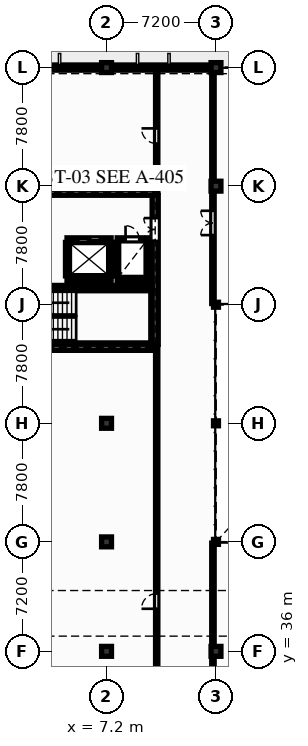
"""IFC4 building model, lengths in metres.
Left out: names, types, materials, properties, quantities, classifications, styles, units other than length and angle.
Written with IfcOpenShell. Run it as: python <this file> out.ifc"""

import sys

from ifc_helpers import new_model, si_unit, direction, frame, frame_2d, origin, origin_2d, place, context, subcontext, project, spatial, rectangle, hollow_circle, extrude, element, fill, save


model = new_model("IFC4")
c1 = context("Model", 3, precision=1e-05, world=origin(), true_north=direction((0.0, 1.0)))
c2 = subcontext(c1, "Body", "Model", "MODEL_VIEW")
j1 = project(units=[si_unit("LENGTHUNIT", "METRE"), si_unit("PLANEANGLEUNIT", "RADIAN")], contexts=[c1])
p1 = place(None, origin())
s1 = spatial("IfcSite", under=j1, at=p1, CompositionType="ELEMENT")
p2 = place(p1, origin())
s2 = spatial("IfcBuilding", under=s1, at=p2, CompositionType="ELEMENT")
p3 = place(p2, frame((0.0, 0.0, 5.1)))
s3 = spatial("IfcBuildingStorey", under=s2, at=p3, CompositionType="ELEMENT", Elevation=5.1)
for number, where, z_axis, x_axis in (
    (1, (7.2, 36.0, 0.0), (0.0, 0.0, 1.0), (1.0, 0.0, 0.0)),
    (2, (7.2, 43.2, 0.0), (0.0, 0.0, 1.0), (1.0, 0.0, 0.0)),
    (3, (7.2, 51.0, 0.0), (0.0, 0.0, 1.0), (1.0, 0.0, 0.0)),
    (4, (7.2, 74.4, 0.0), (0.0, 0.0, 1.0), (1.0, 0.0, 0.0)),
    (5, (14.4, 36.0, 0.0), (0.0, 0.0, 1.0), (1.0, 0.0, 0.0)),
):
    element("IfcColumn", number, at=place(p3, frame(where, z_axis=z_axis, x_axis=x_axis)), inside=s3, PredefinedType="COLUMN", context=c2, shape_type="SweptSolid", body=[
        extrude(rectangle(XDim=0.65, YDim=0.65, at=origin_2d()), origin(), (0.0, 0.0, 1.0), 3.84),
    ])
for number, where, z_axis, x_axis in (
    (6, (14.4, 43.2, 0.0), (0.0, 0.0, 1.0), (1.0, 0.0, 0.0)),
    (7, (14.4, 51.0, 0.0), (0.0, 0.0, 1.0), (1.0, 0.0, 0.0)),
    (8, (14.4, 58.8, 0.0), (0.0, 0.0, 1.0), (1.0, 0.0, 0.0)),
):
    element("IfcColumn", number, at=place(p3, frame(where, z_axis=z_axis, x_axis=x_axis)), inside=s3, PredefinedType="COLUMN", context=c2, shape_type="SweptSolid", body=[
        extrude(hollow_circle(Radius=0.162, WallThickness=0.012, at=origin_2d()), origin(), (0.0, 0.0, 1.0), 3.84),
    ])
for number, where, z_axis, x_axis in (
    (9, (14.4, 66.6, 0.0), (0.0, 0.0, 1.0), (1.0, 0.0, 0.0)),
    (10, (14.4, 74.4, 0.0), (0.0, 0.0, 1.0), (1.0, 0.0, 0.0)),
):
    element("IfcColumn", number, at=place(p3, frame(where, z_axis=z_axis, x_axis=x_axis)), inside=s3, PredefinedType="COLUMN", context=c2, shape_type="SweptSolid", body=[
        extrude(rectangle(XDim=0.65, YDim=0.65, at=origin_2d()), origin(), (0.0, 0.0, 1.0), 3.84),
    ])
p4 = place(p3, frame((0.0, 74.4, 0.0), z_axis=(0.0, 0.0, 1.0), x_axis=(1.0, 0.0, 0.0)))
e11 = element("IfcWall", 11, at=p4, inside=s3, PredefinedType="SOLIDWALL", context=c2, shape_type="SweptSolid", body=[
    extrude(rectangle(XDim=7.2, YDim=0.34, at=frame_2d((3.6, 0.0))), origin(), (0.0, 0.0, 1.0), 3.55),
])
p5 = place(p4, frame((2.2, 0.0, 0.898)))
e12 = element("IfcOpeningElement", 12, at=p5, cuts=e11, PredefinedType="OPENING", context=c2, shape_type="SweptSolid", body=[
    extrude(rectangle(XDim=1.75, YDim=2.15, at=frame_2d((0.875, 1.075))), frame((0.0, 0.18, 0.0), z_axis=(0.0, -1.0, 0.0), x_axis=(1.0, 0.0, 0.0)), (0.0, 0.0, 1.0), 0.36),
])
p6 = place(p3, frame((7.2, 74.4, 0.0), z_axis=(0.0, 0.0, 1.0), x_axis=(1.0, 0.0, 0.0)))
e13 = element("IfcWall", 13, at=p6, inside=s3, PredefinedType="SOLIDWALL", context=c2, shape_type="SweptSolid", body=[
    extrude(rectangle(XDim=7.2, YDim=0.34, at=frame_2d((3.6, 0.0))), origin(), (0.0, 0.0, 1.0), 3.55),
])
p7 = place(p6, frame((4.4, 0.0, 0.898)))
e14 = element("IfcOpeningElement", 14, at=p7, cuts=e13, PredefinedType="OPENING", context=c2, shape_type="SweptSolid", body=[
    extrude(rectangle(XDim=1.75, YDim=2.15, at=frame_2d((0.875, 1.075))), frame((0.0, 0.18, 0.0), z_axis=(0.0, -1.0, 0.0), x_axis=(1.0, 0.0, 0.0)), (0.0, 0.0, 1.0), 0.36),
])
for number, where, z_axis, x_axis in (
    (15, (0.17, 56.0, 0.0), (0.0, 0.0, 1.0), (1.0, 0.0, 0.0)),
    (16, (0.17, 66.2, 0.0), (0.0, 0.0, 1.0), (1.0, 0.0, 0.0)),
):
    element("IfcWall", number, at=place(p3, frame(where, z_axis=z_axis, x_axis=x_axis)), inside=s3, PredefinedType="SHEAR", context=c2, shape_type="SweptSolid", body=[
        extrude(rectangle(XDim=10.23, YDim=0.4, at=frame_2d((5.115, 0.0))), origin(), (0.0, 0.0, 1.0), 3.55),
    ])
p8 = place(p3, frame((10.4, 56.2, 0.0), z_axis=(0.0, 0.0, 1.0), x_axis=(0.0, 1.0, 0.0)))
e17 = element("IfcWall", 17, at=p8, inside=s3, PredefinedType="SHEAR", context=c2, shape_type="SweptSolid", body=[
    extrude(rectangle(XDim=9.8, YDim=0.4, at=frame_2d((4.9, 0.0))), origin(), (0.0, 0.0, 1.0), 3.55),
])
p9 = place(p8, frame((6.8, 0.0, 0.0)))
e18 = element("IfcOpeningElement", 18, at=p9, cuts=e17, PredefinedType="OPENING", context=c2, shape_type="SweptSolid", body=[
    extrude(rectangle(XDim=1.5, YDim=2.2, at=frame_2d((0.75, 1.1))), frame((0.0, 0.21, 0.0), z_axis=(0.0, -1.0, 0.0), x_axis=(1.0, 0.0, 0.0)), (0.0, 0.0, 1.0), 0.42),
])
p10 = place(p3, frame((0.17, 59.895, 0.0), z_axis=(0.0, 0.0, 1.0), x_axis=(1.0, 0.0, 0.0)))
e19 = element("IfcWall", 19, at=p10, inside=s3, PredefinedType="SHEAR", context=c2, shape_type="SweptSolid", body=[
    extrude(rectangle(XDim=10.03, YDim=0.35, at=frame_2d((5.015, 0.0))), origin(), (0.0, 0.0, 1.0), 3.55),
])
p11 = place(p10, frame((0.45, 0.0, 0.0)))
e20 = element("IfcOpeningElement", 20, at=p11, cuts=e19, PredefinedType="OPENING", context=c2, shape_type="SweptSolid", body=[
    extrude(rectangle(XDim=1.05, YDim=2.2, at=frame_2d((0.525, 1.1))), frame((0.0, 0.185, 0.0), z_axis=(0.0, -1.0, 0.0), x_axis=(1.0, 0.0, 0.0)), (0.0, 0.0, 1.0), 0.37),
])
p12 = place(p3, frame((4.6, 60.5, 0.0), z_axis=(0.0, 0.0, 1.0), x_axis=(1.0, 0.0, 0.0)))
e21 = element("IfcWall", 21, at=p12, inside=s3, PredefinedType="PARTITIONING", context=c2, shape_type="SweptSolid", body=[
    extrude(rectangle(XDim=2.9, YDim=0.2, at=frame_2d((1.45, 0.0))), origin(), (0.0, 0.0, 1.0), 3.55),
])
p13 = place(p3, frame((4.6, 63.1, 0.0), z_axis=(0.0, 0.0, 1.0), x_axis=(1.0, 0.0, 0.0)))
e22 = element("IfcWall", 22, at=p13, inside=s3, PredefinedType="PARTITIONING", context=c2, shape_type="SweptSolid", body=[
    extrude(rectangle(XDim=2.9, YDim=0.2, at=frame_2d((1.45, 0.0))), origin(), (0.0, 0.0, 1.0), 3.55),
])
p14 = place(p13, frame((0.75, 0.0, 0.0)))
e23 = element("IfcOpeningElement", 23, at=p14, cuts=e22, PredefinedType="OPENING", context=c2, shape_type="SweptSolid", body=[
    extrude(rectangle(XDim=1.4, YDim=2.25, at=frame_2d((0.7, 1.125))), frame((0.0, 0.11, 0.0), z_axis=(0.0, -1.0, 0.0), x_axis=(1.0, 0.0, 0.0)), (0.0, 0.0, 1.0), 0.22),
])
for number, where, z_axis, x_axis in (
    (24, (4.6, 60.7, 0.0), (0.0, 0.0, 1.0), (0.0, 1.0, 0.0)),
    (25, (7.5, 60.7, 0.0), (0.0, 0.0, 1.0), (0.0, 1.0, 0.0)),
):
    element("IfcWall", number, at=place(p3, frame(where, z_axis=z_axis, x_axis=x_axis)), inside=s3, PredefinedType="PARTITIONING", context=c2, shape_type="SweptSolid", body=[
        extrude(rectangle(XDim=2.2, YDim=0.2, at=frame_2d((1.1, 0.0))), origin(), (0.0, 0.0, 1.0), 3.55),
    ])
p15 = place(p3, frame((7.9, 60.5, 0.0), z_axis=(0.0, 0.0, 1.0), x_axis=(1.0, 0.0, 0.0)))
e26 = element("IfcWall", 26, at=p15, inside=s3, PredefinedType="PARTITIONING", context=c2, shape_type="SweptSolid", body=[
    extrude(rectangle(XDim=2.0, YDim=0.2, at=frame_2d((1.0, 0.0))), origin(), (0.0, 0.0, 1.0), 3.55),
])
p16 = place(p3, frame((7.9, 63.1, 0.0), z_axis=(0.0, 0.0, 1.0), x_axis=(1.0, 0.0, 0.0)))
e27 = element("IfcWall", 27, at=p16, inside=s3, PredefinedType="PARTITIONING", context=c2, shape_type="SweptSolid", body=[
    extrude(rectangle(XDim=2.0, YDim=0.2, at=frame_2d((1.0, 0.0))), origin(), (0.0, 0.0, 1.0), 3.55),
])
p17 = place(p16, frame((0.55, 0.0, 0.0)))
e28 = element("IfcOpeningElement", 28, at=p17, cuts=e27, PredefinedType="OPENING", context=c2, shape_type="SweptSolid", body=[
    extrude(rectangle(XDim=0.9, YDim=2.1, at=frame_2d((0.45, 1.05))), frame((0.0, 0.11, 0.0), z_axis=(0.0, -1.0, 0.0), x_axis=(1.0, 0.0, 0.0)), (0.0, 0.0, 1.0), 0.22),
])
for number, where, z_axis, x_axis in (
    (29, (7.9, 60.7, 0.0), (0.0, 0.0, 1.0), (0.0, 1.0, 0.0)),
    (30, (9.9, 60.7, 0.0), (0.0, 0.0, 1.0), (0.0, 1.0, 0.0)),
):
    element("IfcWall", number, at=place(p3, frame(where, z_axis=z_axis, x_axis=x_axis)), inside=s3, PredefinedType="PARTITIONING", context=c2, shape_type="SweptSolid", body=[
        extrude(rectangle(XDim=2.2, YDim=0.2, at=frame_2d((1.1, 0.0))), origin(), (0.0, 0.0, 1.0), 3.55),
    ])
p18 = place(p3, frame((14.2, 28.8, 0.0), z_axis=(0.0, 0.0, 1.0), x_axis=(0.0, 1.0, 0.0)))
e31 = element("IfcWall", 31, at=p18, inside=s3, PredefinedType="PARTITIONING", context=c2, shape_type="SweptSolid", body=[
    extrude(rectangle(XDim=14.32, YDim=0.16, at=frame_2d((7.16, 0.0))), origin(), (0.0, 0.0, 1.0), 2.943),
])
p19 = place(p18, frame((4.5, 0.0, 0.0)))
e32 = element("IfcOpeningElement", 32, at=p19, cuts=e31, PredefinedType="OPENING", context=c2, shape_type="SweptSolid", body=[
    extrude(rectangle(XDim=1.6, YDim=2.2, at=frame_2d((0.8, 1.1))), frame((0.0, 0.09, 0.0), z_axis=(0.0, -1.0, 0.0), x_axis=(1.0, 0.0, 0.0)), (0.0, 0.0, 1.0), 0.18),
])
p20 = place(p3, frame((14.2, 58.88, 0.0), z_axis=(0.0, 0.0, 1.0), x_axis=(0.0, 1.0, 0.0)))
e33 = element("IfcWall", 33, at=p20, inside=s3, PredefinedType="PARTITIONING", context=c2, shape_type="SweptSolid", body=[
    extrude(rectangle(XDim=15.52, YDim=0.16, at=frame_2d((7.76, 0.0))), origin(), (0.0, 0.0, 1.0), 2.943),
])
p21 = place(p20, frame((4.5, 0.0, 0.0)))
e34 = element("IfcOpeningElement", 34, at=p21, cuts=e33, PredefinedType="OPENING", context=c2, shape_type="SweptSolid", body=[
    extrude(rectangle(XDim=1.6, YDim=2.2, at=frame_2d((0.8, 1.1))), frame((0.0, 0.09, 0.0), z_axis=(0.0, -1.0, 0.0), x_axis=(1.0, 0.0, 0.0)), (0.0, 0.0, 1.0), 0.18),
])
p22 = place(p3, frame((10.5, 28.8, 0.0), z_axis=(0.0, 0.0, 1.0), x_axis=(0.0, 1.0, 0.0)))
e35 = element("IfcWall", 35, at=p22, inside=s3, PredefinedType="PARTITIONING", context=c2, shape_type="SweptSolid", body=[
    extrude(rectangle(XDim=27.2, YDim=0.15, at=frame_2d((13.6, 0.0))), origin(), (0.0, 0.0, 1.0), 3.199),
])
p23 = place(p22, frame((10.0, 0.0, 0.0)))
e36 = element("IfcOpeningElement", 36, at=p23, cuts=e35, PredefinedType="OPENING", context=c2, shape_type="SweptSolid", body=[
    extrude(rectangle(XDim=1.0, YDim=2.15, at=frame_2d((0.5, 1.075))), frame((0.0, 0.085, 0.0), z_axis=(0.0, -1.0, 0.0), x_axis=(1.0, 0.0, 0.0)), (0.0, 0.0, 1.0), 0.17),
])
p24 = place(p3, frame((10.5, 66.2, 0.0), z_axis=(0.0, 0.0, 1.0), x_axis=(0.0, 1.0, 0.0)))
e37 = element("IfcWall", 37, at=p24, inside=s3, PredefinedType="PARTITIONING", context=c2, shape_type="SweptSolid", body=[
    extrude(rectangle(XDim=8.2, YDim=0.15, at=frame_2d((4.1, 0.0))), origin(), (0.0, 0.0, 1.0), 3.55),
])
p25 = place(p24, frame((3.2, 0.0, 0.0)))
e38 = element("IfcOpeningElement", 38, at=p25, cuts=e37, PredefinedType="OPENING", context=c2, shape_type="SweptSolid", body=[
    extrude(rectangle(XDim=1.0, YDim=2.15, at=frame_2d((0.5, 1.075))), frame((0.0, 0.085, 0.0), z_axis=(0.0, -1.0, 0.0), x_axis=(1.0, 0.0, 0.0)), (0.0, 0.0, 1.0), 0.17),
])
p26 = place(p5, origin())
e39 = element("IfcWindow", 39, at=p26, inside=s3, PartitioningType="SINGLE_PANEL", PredefinedType="WINDOW", context=c2, shape_type="SweptSolid", body=[
    extrude(rectangle(XDim=1.75, YDim=2.15, at=frame_2d((0.875, 1.075))), frame((0.0, 0.03, 0.0), z_axis=(0.0, -1.0, 0.0), x_axis=(1.0, 0.0, 0.0)), (0.0, 0.0, 1.0), 0.06),
])
fill(e12, e39)
p27 = place(p7, origin())
e40 = element("IfcWindow", 40, at=p27, inside=s3, PartitioningType="SINGLE_PANEL", PredefinedType="WINDOW", context=c2, shape_type="SweptSolid", body=[
    extrude(rectangle(XDim=1.75, YDim=2.15, at=frame_2d((0.875, 1.075))), frame((0.0, 0.03, 0.0), z_axis=(0.0, -1.0, 0.0), x_axis=(1.0, 0.0, 0.0)), (0.0, 0.0, 1.0), 0.06),
])
fill(e14, e40)
p28 = place(p9, origin())
e41 = element("IfcDoor", 41, at=p28, inside=s3, OperationType="DOUBLE_DOOR_SINGLE_SWING", PredefinedType="DOOR", context=c2, shape_type="SweptSolid", body=[
    extrude(rectangle(XDim=1.5, YDim=2.2, at=frame_2d((0.75, 1.1))), frame((0.0, 0.025, 0.0), z_axis=(0.0, -1.0, 0.0), x_axis=(1.0, 0.0, 0.0)), (0.0, 0.0, 1.0), 0.05),
])
fill(e18, e41)
p29 = place(p14, origin())
e42 = element("IfcDoor", 42, at=p29, inside=s3, OperationType="SLIDING_TO_LEFT", PredefinedType="DOOR", context=c2, shape_type="SweptSolid", body=[
    extrude(rectangle(XDim=1.4, YDim=2.25, at=frame_2d((0.7, 1.125))), frame((0.0, 0.025, 0.0), z_axis=(0.0, -1.0, 0.0), x_axis=(1.0, 0.0, 0.0)), (0.0, 0.0, 1.0), 0.05),
])
fill(e23, e42)
p30 = place(p17, origin())
e43 = element("IfcDoor", 43, at=p30, inside=s3, OperationType="SINGLE_SWING_LEFT", PredefinedType="DOOR", context=c2, shape_type="SweptSolid", body=[
    extrude(rectangle(XDim=0.9, YDim=2.1, at=frame_2d((0.45, 1.05))), frame((0.0, 0.025, 0.0), z_axis=(0.0, -1.0, 0.0), x_axis=(1.0, 0.0, 0.0)), (0.0, 0.0, 1.0), 0.05),
])
fill(e28, e43)
p31 = place(p21, origin())
e44 = element("IfcDoor", 44, at=p31, inside=s3, OperationType="DOUBLE_DOOR_SINGLE_SWING", PredefinedType="DOOR", context=c2, shape_type="SweptSolid", body=[
    extrude(rectangle(XDim=1.6, YDim=2.2, at=frame_2d((0.8, 1.1))), frame((0.0, 0.025, 0.0), z_axis=(0.0, -1.0, 0.0), x_axis=(1.0, 0.0, 0.0)), (0.0, 0.0, 1.0), 0.05),
])
fill(e34, e44)
p32 = place(p23, origin())
e45 = element("IfcDoor", 45, at=p32, inside=s3, OperationType="SINGLE_SWING_LEFT", PredefinedType="DOOR", context=c2, shape_type="SweptSolid", body=[
    extrude(rectangle(XDim=1.0, YDim=2.15, at=frame_2d((0.5, 1.075))), frame((0.0, 0.025, 0.0), z_axis=(0.0, -1.0, 0.0), x_axis=(1.0, 0.0, 0.0)), (0.0, 0.0, 1.0), 0.05),
])
fill(e36, e45)
p33 = place(p25, origin())
e46 = element("IfcDoor", 46, at=p33, inside=s3, OperationType="SINGLE_SWING_RIGHT", PredefinedType="DOOR", context=c2, shape_type="SweptSolid", body=[
    extrude(rectangle(XDim=1.0, YDim=2.15, at=frame_2d((0.5, 1.075))), frame((0.0, 0.025, 0.0), z_axis=(0.0, -1.0, 0.0), x_axis=(1.0, 0.0, 0.0)), (0.0, 0.0, 1.0), 0.05),
])
fill(e38, e46)
save(model, sys.argv[1])
